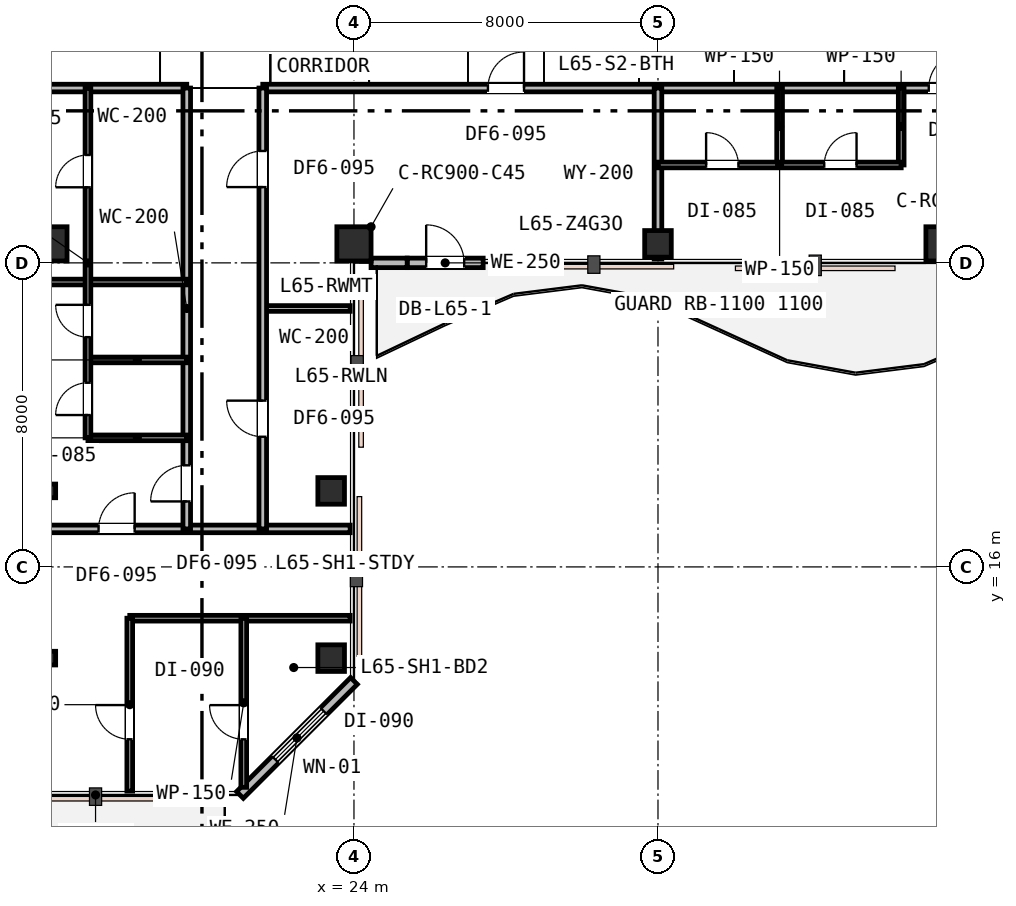
"""IFC4 building model, lengths in metres.
Left out: names, types, materials, properties, quantities, classifications, styles, units other than length and angle.
Written with IfcOpenShell. Run it as: python <this file> out.ifc"""

import sys

from ifc_helpers import new_model, si_unit, direction, frame, frame_2d, origin, origin_2d, place, context, subcontext, project, spatial, rectangle, i_section, extrude, element, fill, save


model = new_model("IFC4")
c1 = context("Model", 3, precision=1e-05, world=origin(), true_north=direction((0.0, 1.0)))
c2 = subcontext(c1, "Body", "Model", "MODEL_VIEW")
j1 = project(units=[si_unit("LENGTHUNIT", "METRE"), si_unit("PLANEANGLEUNIT", "RADIAN")], contexts=[c1])
p1 = place(None, origin())
s1 = spatial("IfcSite", under=j1, at=p1, CompositionType="ELEMENT")
p2 = place(p1, origin())
s2 = spatial("IfcBuilding", under=s1, at=p2, CompositionType="ELEMENT")
p3 = place(p2, frame((0.0, 0.0, 252.6)))
s3 = spatial("IfcBuildingStorey", under=s2, at=p3, CompositionType="ELEMENT", Elevation=252.6)
for number, where, z_axis, x_axis in (
    (1, (16.0, 24.5, 0.0), (0.0, 0.0, 1.0), (1.0, 0.0, 0.0)),
    (2, (24.0, 24.5, 0.0), (0.0, 0.0, 1.0), (1.0, 0.0, 0.0)),
):
    element("IfcColumn", number, at=place(p3, frame(where, z_axis=z_axis, x_axis=x_axis)), inside=s3, PredefinedType="COLUMN", context=c2, shape_type="SweptSolid", body=[
        extrude(rectangle(XDim=0.9, YDim=0.9, at=origin_2d()), origin(), (0.0, 0.0, 1.0), 3.8),
    ])
p4 = place(p3, frame((32.0, 24.5, 0.0), z_axis=(0.0, 0.0, 1.0), x_axis=(1.0, 0.0, 0.0)))
e3 = element("IfcColumn", 3, at=p4, inside=s3, PredefinedType="COLUMN", context=c2, shape_type="SweptSolid", body=[
    extrude(rectangle(XDim=0.7, YDim=0.7, at=origin_2d()), origin(), (0.0, 0.0, 1.0), 3.8),
])
p5 = place(p3, frame((39.5, 24.5, 0.0), z_axis=(0.0, 0.0, 1.0), x_axis=(1.0, 0.0, 0.0)))
e4 = element("IfcColumn", 4, at=p5, inside=s3, PredefinedType="COLUMN", context=c2, shape_type="SweptSolid", body=[
    extrude(rectangle(XDim=0.9, YDim=0.9, at=origin_2d()), origin(), (0.0, 0.0, 1.0), 3.8),
])
for number, where, z_axis, x_axis in (
    (5, (23.4, 13.6, 0.0), (0.0, 0.0, 1.0), (1.0, 0.0, 0.0)),
    (6, (23.4, 18.0, 0.0), (0.0, 0.0, 1.0), (1.0, 0.0, 0.0)),
):
    element("IfcColumn", number, at=place(p3, frame(where, z_axis=z_axis, x_axis=x_axis)), inside=s3, PredefinedType="COLUMN", context=c2, shape_type="SweptSolid", body=[
        extrude(rectangle(XDim=0.7, YDim=0.7, at=origin_2d()), origin(), (0.0, 0.0, 1.0), 3.8),
    ])
for number, where, z_axis, x_axis in (
    (7, (16.0, 13.6, 0.0), (0.0, 0.0, 1.0), (1.0, 0.0, 0.0)),
    (8, (16.0, 18.0, 0.0), (0.0, 0.0, 1.0), (1.0, 0.0, 0.0)),
):
    element("IfcColumn", number, at=place(p3, frame(where, z_axis=z_axis, x_axis=x_axis)), inside=s3, PredefinedType="COLUMN", context=c2, shape_type="SweptSolid", body=[
        extrude(i_section(OverallWidth=0.3, OverallDepth=0.36, WebThickness=0.013, FlangeThickness=0.022, FilletRadius=0.027, at=origin_2d()), origin(), (0.0, 0.0, 1.0), 3.8),
    ])
p6 = place(p3, frame((21.0, 10.0, 0.0), z_axis=(0.0, 0.0, 1.0), x_axis=(0.707106781187, 0.707106781187, 0.0)))
e9 = element("IfcWall", 9, at=p6, inside=s3, PredefinedType="STANDARD", context=c2, shape_type="SweptSolid", body=[
    extrude(rectangle(XDim=4.243, YDim=0.25, at=frame_2d((2.121, 0.0))), origin(), (0.0, 0.0, 1.0), 3.53),
])
p7 = place(p6, frame((1.317, 0.0, 0.75)))
e10 = element("IfcOpeningElement", 10, at=p7, cuts=e9, PredefinedType="OPENING", context=c2, shape_type="SweptSolid", body=[
    extrude(rectangle(XDim=1.8, YDim=1.85, at=frame_2d((0.9, 0.925))), frame((0.0, 0.135, 0.0), z_axis=(0.0, -1.0, 0.0), x_axis=(1.0, 0.0, 0.0)), (0.0, 0.0, 1.0), 0.27),
])
p8 = place(p3, frame((25.4, 24.0, 0.0), z_axis=(0.0, 0.0, 1.0), x_axis=(1.0, 0.0, 0.0)))
e11 = element("IfcWall", 11, at=p8, inside=s3, PredefinedType="STANDARD", context=c2, shape_type="SweptSolid", body=[
    extrude(rectangle(XDim=2.0, YDim=0.25, at=frame_2d((1.0, 0.0))), origin(), (0.0, 0.0, 1.0), 3.27),
])
p9 = place(p8, frame((0.5, 0.0, 0.0)))
e12 = element("IfcOpeningElement", 12, at=p9, cuts=e11, PredefinedType="OPENING", context=c2, shape_type="SweptSolid", body=[
    extrude(rectangle(XDim=1.0, YDim=2.15, at=frame_2d((0.5, 1.075))), frame((0.0, 0.135, 0.0), z_axis=(0.0, -1.0, 0.0), x_axis=(1.0, 0.0, 0.0)), (0.0, 0.0, 1.0), 0.27),
])
p10 = place(p3, frame((24.45, 24.0, 0.0), z_axis=(0.0, 0.0, 1.0), x_axis=(1.0, 0.0, 0.0)))
e13 = element("IfcWall", 13, at=p10, inside=s3, PredefinedType="STANDARD", context=c2, shape_type="SweptSolid", body=[
    extrude(rectangle(XDim=0.95, YDim=0.25, at=frame_2d((0.475, 0.0))), origin(), (0.0, 0.0, 1.0), 3.27),
])
p11 = place(p3, frame((15.2, 28.6, 0.0), z_axis=(0.0, 0.0, 1.0), x_axis=(1.0, 0.0, 0.0)))
e14 = element("IfcWall", 14, at=p11, inside=s3, PredefinedType="PARTITIONING", context=c2, shape_type="SweptSolid", body=[
    extrude(rectangle(XDim=4.4, YDim=0.2, at=frame_2d((2.2, 0.0))), origin(), (0.0, 0.0, 1.0), 3.16),
])
p12 = place(p3, frame((21.6, 28.6, 0.0), z_axis=(0.0, 0.0, 1.0), x_axis=(1.0, 0.0, 0.0)))
e15 = element("IfcWall", 15, at=p12, inside=s3, PredefinedType="PARTITIONING", context=c2, shape_type="SweptSolid", body=[
    extrude(rectangle(XDim=24.3, YDim=0.2, at=frame_2d((12.15, 0.0))), origin(), (0.0, 0.0, 1.0), 3.16),
])
p13 = place(p12, frame((5.925, 0.0, 0.0)))
e16 = element("IfcOpeningElement", 16, at=p13, cuts=e15, PredefinedType="OPENING", context=c2, shape_type="SweptSolid", body=[
    extrude(rectangle(XDim=0.95, YDim=2.15, at=frame_2d((0.475, 1.075))), frame((0.0, 0.11, 0.0), z_axis=(0.0, -1.0, 0.0), x_axis=(1.0, 0.0, 0.0)), (0.0, 0.0, 1.0), 0.22),
])
p14 = place(p12, frame((17.525, 0.0, 0.0)))
e17 = element("IfcOpeningElement", 17, at=p14, cuts=e15, PredefinedType="OPENING", context=c2, shape_type="SweptSolid", body=[
    extrude(rectangle(XDim=0.95, YDim=2.15, at=frame_2d((0.475, 1.075))), frame((0.0, 0.11, 0.0), z_axis=(0.0, -1.0, 0.0), x_axis=(1.0, 0.0, 0.0)), (0.0, 0.0, 1.0), 0.22),
])
p15 = place(p3, frame((32.0, 24.1, 0.0), z_axis=(0.0, 0.0, 1.0), x_axis=(0.0, 1.0, 0.0)))
e18 = element("IfcWall", 18, at=p15, inside=s3, PredefinedType="PARTITIONING", context=c2, shape_type="SweptSolid", body=[
    extrude(rectangle(XDim=4.5, YDim=0.2, at=frame_2d((2.25, 0.0))), origin(), (0.0, 0.0, 1.0), 3.16),
])
for number, where, z_axis, x_axis in (
    (19, (38.4, 26.576, 0.0), (0.0, 0.0, 1.0), (0.0, 1.0, 0.0)),
    (20, (35.2, 26.576, 0.0), (0.0, 0.0, 1.0), (0.0, 1.0, 0.0)),
):
    element("IfcWall", number, at=place(p3, frame(where, z_axis=z_axis, x_axis=x_axis)), inside=s3, PredefinedType="PARTITIONING", context=c2, shape_type="SweptSolid", body=[
        extrude(rectangle(XDim=2.024, YDim=0.15, at=frame_2d((1.012, 0.0))), origin(), (0.0, 0.0, 1.0), 3.53),
    ])
p16 = place(p3, frame((32.0, 26.576, 0.0), z_axis=(0.0, 0.0, 1.0), x_axis=(1.0, 0.0, 0.0)))
e21 = element("IfcWall", 21, at=p16, inside=s3, PredefinedType="PARTITIONING", context=c2, shape_type="SweptSolid", body=[
    extrude(rectangle(XDim=6.4, YDim=0.15, at=frame_2d((3.2, 0.0))), origin(), (0.0, 0.0, 1.0), 3.16),
])
p17 = place(p16, frame((1.266, 0.0, 0.0)))
e22 = element("IfcOpeningElement", 22, at=p17, cuts=e21, PredefinedType="OPENING", context=c2, shape_type="SweptSolid", body=[
    extrude(rectangle(XDim=0.85, YDim=2.15, at=frame_2d((0.425, 1.075))), frame((0.0, 0.085, 0.0), z_axis=(0.0, -1.0, 0.0), x_axis=(1.0, 0.0, 0.0)), (0.0, 0.0, 1.0), 0.17),
])
p18 = place(p16, frame((4.375, 0.0, 0.0)))
e23 = element("IfcOpeningElement", 23, at=p18, cuts=e21, PredefinedType="OPENING", context=c2, shape_type="SweptSolid", body=[
    extrude(rectangle(XDim=0.85, YDim=2.15, at=frame_2d((0.425, 1.075))), frame((0.0, 0.085, 0.0), z_axis=(0.0, -1.0, 0.0), x_axis=(1.0, 0.0, 0.0)), (0.0, 0.0, 1.0), 0.17),
])
p19 = place(p3, frame((5.1, 17.0, 0.0), z_axis=(0.0, 0.0, 1.0), x_axis=(1.0, 0.0, 0.0)))
e24 = element("IfcWall", 24, at=p19, inside=s3, PredefinedType="PARTITIONING", context=c2, shape_type="SweptSolid", body=[
    extrude(rectangle(XDim=18.8, YDim=0.2, at=frame_2d((9.4, 0.0))), origin(), (0.0, 0.0, 1.0), 3.16),
])
p20 = place(p19, frame((12.179, 0.0, 0.0)))
e25 = element("IfcOpeningElement", 25, at=p20, cuts=e24, PredefinedType="OPENING", context=c2, shape_type="SweptSolid", body=[
    extrude(rectangle(XDim=0.95, YDim=2.15, at=frame_2d((0.475, 1.075))), frame((0.0, 0.11, 0.0), z_axis=(0.0, -1.0, 0.0), x_axis=(1.0, 0.0, 0.0)), (0.0, 0.0, 1.0), 0.22),
])
p21 = place(p3, frame((19.6, 17.0, 0.0), z_axis=(0.0, 0.0, 1.0), x_axis=(0.0, 1.0, 0.0)))
e26 = element("IfcWall", 26, at=p21, inside=s3, PredefinedType="PARTITIONING", context=c2, shape_type="SweptSolid", body=[
    extrude(rectangle(XDim=11.6, YDim=0.2, at=frame_2d((5.8, 0.0))), origin(), (0.0, 0.0, 1.0), 3.16),
])
p22 = place(p21, frame((0.723, 0.0, 0.0)))
e27 = element("IfcOpeningElement", 27, at=p22, cuts=e26, PredefinedType="OPENING", context=c2, shape_type="SweptSolid", body=[
    extrude(rectangle(XDim=0.95, YDim=2.15, at=frame_2d((0.475, 1.075))), frame((0.0, 0.11, 0.0), z_axis=(0.0, -1.0, 0.0), x_axis=(1.0, 0.0, 0.0)), (0.0, 0.0, 1.0), 0.22),
])
for number, where, z_axis, x_axis in (
    (28, (17.0, 19.396, 0.0), (0.0, 0.0, 1.0), (1.0, 0.0, 0.0)),
    (29, (17.0, 21.446, 0.0), (0.0, 0.0, 1.0), (1.0, 0.0, 0.0)),
):
    element("IfcWall", number, at=place(p3, frame(where, z_axis=z_axis, x_axis=x_axis)), inside=s3, PredefinedType="PARTITIONING", context=c2, shape_type="SweptSolid", body=[
        extrude(rectangle(XDim=2.6, YDim=0.15, at=frame_2d((1.3, 0.0))), origin(), (0.0, 0.0, 1.0), 3.53),
    ])
p23 = place(p3, frame((5.1, 23.496, 0.0), z_axis=(0.0, 0.0, 1.0), x_axis=(1.0, 0.0, 0.0)))
e30 = element("IfcWall", 30, at=p23, inside=s3, PredefinedType="PARTITIONING", context=c2, shape_type="SweptSolid", body=[
    extrude(rectangle(XDim=14.5, YDim=0.15, at=frame_2d((7.25, 0.0))), origin(), (0.0, 0.0, 1.0), 3.16),
])
p24 = place(p23, frame((5.5, 0.0, 0.0)))
e31 = element("IfcOpeningElement", 31, at=p24, cuts=e30, PredefinedType="OPENING", context=c2, shape_type="SweptSolid", body=[
    extrude(rectangle(XDim=0.9, YDim=2.15, at=frame_2d((0.45, 1.075))), frame((0.0, 0.085, 0.0), z_axis=(0.0, -1.0, 0.0), x_axis=(1.0, 0.0, 0.0)), (0.0, 0.0, 1.0), 0.17),
])
p25 = place(p3, frame((17.0, 19.396, 0.0), z_axis=(0.0, 0.0, 1.0), x_axis=(0.0, 1.0, 0.0)))
e32 = element("IfcWall", 32, at=p25, inside=s3, PredefinedType="PARTITIONING", context=c2, shape_type="SweptSolid", body=[
    extrude(rectangle(XDim=9.204, YDim=0.15, at=frame_2d((4.602, 0.0))), origin(), (0.0, 0.0, 1.0), 3.16),
])
p26 = place(p25, frame((0.6, 0.0, 0.0)))
e33 = element("IfcOpeningElement", 33, at=p26, cuts=e32, PredefinedType="OPENING", context=c2, shape_type="SweptSolid", body=[
    extrude(rectangle(XDim=0.85, YDim=2.15, at=frame_2d((0.425, 1.075))), frame((0.0, 0.085, 0.0), z_axis=(0.0, -1.0, 0.0), x_axis=(1.0, 0.0, 0.0)), (0.0, 0.0, 1.0), 0.17),
])
p27 = place(p25, frame((2.65, 0.0, 0.0)))
e34 = element("IfcOpeningElement", 34, at=p27, cuts=e32, PredefinedType="OPENING", context=c2, shape_type="SweptSolid", body=[
    extrude(rectangle(XDim=0.85, YDim=2.15, at=frame_2d((0.425, 1.075))), frame((0.0, 0.085, 0.0), z_axis=(0.0, -1.0, 0.0), x_axis=(1.0, 0.0, 0.0)), (0.0, 0.0, 1.0), 0.17),
])
p28 = place(p25, frame((6.593, 0.0, 0.0)))
e35 = element("IfcOpeningElement", 35, at=p28, cuts=e32, PredefinedType="OPENING", context=c2, shape_type="SweptSolid", body=[
    extrude(rectangle(XDim=0.85, YDim=2.15, at=frame_2d((0.425, 1.075))), frame((0.0, 0.085, 0.0), z_axis=(0.0, -1.0, 0.0), x_axis=(1.0, 0.0, 0.0)), (0.0, 0.0, 1.0), 0.17),
])
p29 = place(p3, frame((21.6, 22.8, 0.0), z_axis=(0.0, 0.0, 1.0), x_axis=(1.0, 0.0, 0.0)))
e36 = element("IfcWall", 36, at=p29, inside=s3, PredefinedType="PARTITIONING", context=c2, shape_type="SweptSolid", body=[
    extrude(rectangle(XDim=2.3, YDim=0.15, at=frame_2d((1.15, 0.0))), origin(), (0.0, 0.0, 1.0), 3.53),
])
p30 = place(p3, frame((21.6, 17.0, 0.0), z_axis=(0.0, 0.0, 1.0), x_axis=(0.0, 1.0, 0.0)))
e37 = element("IfcWall", 37, at=p30, inside=s3, PredefinedType="PARTITIONING", context=c2, shape_type="SweptSolid", body=[
    extrude(rectangle(XDim=11.6, YDim=0.2, at=frame_2d((5.8, 0.0))), origin(), (0.0, 0.0, 1.0), 3.16),
])
p31 = place(p30, frame((8.994, 0.0, 0.0)))
e38 = element("IfcOpeningElement", 38, at=p31, cuts=e37, PredefinedType="OPENING", context=c2, shape_type="SweptSolid", body=[
    extrude(rectangle(XDim=0.95, YDim=2.15, at=frame_2d((0.475, 1.075))), frame((0.0, 0.11, 0.0), z_axis=(0.0, -1.0, 0.0), x_axis=(1.0, 0.0, 0.0)), (0.0, 0.0, 1.0), 0.22),
])
p32 = place(p30, frame((2.425, 0.0, 0.0)))
e39 = element("IfcOpeningElement", 39, at=p32, cuts=e37, PredefinedType="OPENING", context=c2, shape_type="SweptSolid", body=[
    extrude(rectangle(XDim=0.95, YDim=2.15, at=frame_2d((0.475, 1.075))), frame((0.0, 0.11, 0.0), z_axis=(0.0, -1.0, 0.0), x_axis=(1.0, 0.0, 0.0)), (0.0, 0.0, 1.0), 0.22),
])
p33 = place(p3, frame((18.1, 14.65, 0.0), z_axis=(0.0, 0.0, 1.0), x_axis=(1.0, 0.0, 0.0)))
e40 = element("IfcWall", 40, at=p33, inside=s3, PredefinedType="PARTITIONING", context=c2, shape_type="SweptSolid", body=[
    extrude(rectangle(XDim=5.8, YDim=0.15, at=frame_2d((2.9, 0.0))), origin(), (0.0, 0.0, 1.0), 3.53),
])
p34 = place(p3, frame((21.1, 10.2, 0.0), z_axis=(0.0, 0.0, 1.0), x_axis=(0.0, 1.0, 0.0)))
e41 = element("IfcWall", 41, at=p34, inside=s3, PredefinedType="PARTITIONING", context=c2, shape_type="SweptSolid", body=[
    extrude(rectangle(XDim=4.45, YDim=0.15, at=frame_2d((2.225, 0.0))), origin(), (0.0, 0.0, 1.0), 3.53),
])
p35 = place(p34, frame((1.263, 0.0, 0.0)))
e42 = element("IfcOpeningElement", 42, at=p35, cuts=e41, PredefinedType="OPENING", context=c2, shape_type="SweptSolid", body=[
    extrude(rectangle(XDim=0.9, YDim=2.15, at=frame_2d((0.45, 1.075))), frame((0.0, 0.085, 0.0), z_axis=(0.0, -1.0, 0.0), x_axis=(1.0, 0.0, 0.0)), (0.0, 0.0, 1.0), 0.17),
])
p36 = place(p3, frame((18.1, 10.1, 0.0), z_axis=(0.0, 0.0, 1.0), x_axis=(0.0, 1.0, 0.0)))
e43 = element("IfcWall", 43, at=p36, inside=s3, PredefinedType="PARTITIONING", context=c2, shape_type="SweptSolid", body=[
    extrude(rectangle(XDim=4.55, YDim=0.15, at=frame_2d((2.275, 0.0))), origin(), (0.0, 0.0, 1.0), 3.53),
])
p37 = place(p36, frame((1.365, 0.0, 0.0)))
e44 = element("IfcOpeningElement", 44, at=p37, cuts=e43, PredefinedType="OPENING", context=c2, shape_type="SweptSolid", body=[
    extrude(rectangle(XDim=0.9, YDim=2.15, at=frame_2d((0.45, 1.075))), frame((0.0, 0.085, 0.0), z_axis=(0.0, -1.0, 0.0), x_axis=(1.0, 0.0, 0.0)), (0.0, 0.0, 1.0), 0.17),
])
p38 = place(p7, origin())
e45 = element("IfcWindow", 45, at=p38, inside=s3, PartitioningType="SINGLE_PANEL", PredefinedType="WINDOW", context=c2, shape_type="SweptSolid", body=[
    extrude(rectangle(XDim=1.8, YDim=1.85, at=frame_2d((0.9, 0.925))), frame((0.0, 0.03, 0.0), z_axis=(0.0, -1.0, 0.0), x_axis=(1.0, 0.0, 0.0)), (0.0, 0.0, 1.0), 0.06),
])
fill(e10, e45)
p39 = place(p9, origin())
e46 = element("IfcDoor", 46, at=p39, inside=s3, OperationType="SINGLE_SWING_LEFT", PredefinedType="DOOR", context=c2, shape_type="SweptSolid", body=[
    extrude(rectangle(XDim=1.0, YDim=2.15, at=frame_2d((0.5, 1.075))), frame((0.0, 0.025, 0.0), z_axis=(0.0, -1.0, 0.0), x_axis=(1.0, 0.0, 0.0)), (0.0, 0.0, 1.0), 0.05),
])
fill(e12, e46)
p40 = place(p13, origin())
e47 = element("IfcDoor", 47, at=p40, inside=s3, OperationType="SINGLE_SWING_RIGHT", PredefinedType="DOOR", context=c2, shape_type="SweptSolid", body=[
    extrude(rectangle(XDim=0.95, YDim=2.15, at=frame_2d((0.475, 1.075))), frame((0.0, 0.025, 0.0), z_axis=(0.0, -1.0, 0.0), x_axis=(1.0, 0.0, 0.0)), (0.0, 0.0, 1.0), 0.05),
])
fill(e16, e47)
p41 = place(p14, origin())
e48 = element("IfcDoor", 48, at=p41, inside=s3, OperationType="SINGLE_SWING_RIGHT", PredefinedType="DOOR", context=c2, shape_type="SweptSolid", body=[
    extrude(rectangle(XDim=0.95, YDim=2.15, at=frame_2d((0.475, 1.075))), frame((0.0, 0.025, 0.0), z_axis=(0.0, -1.0, 0.0), x_axis=(1.0, 0.0, 0.0)), (0.0, 0.0, 1.0), 0.05),
])
fill(e17, e48)
p42 = place(p17, origin())
e49 = element("IfcDoor", 49, at=p42, inside=s3, OperationType="SINGLE_SWING_LEFT", PredefinedType="DOOR", context=c2, shape_type="SweptSolid", body=[
    extrude(rectangle(XDim=0.85, YDim=2.15, at=frame_2d((0.425, 1.075))), frame((0.0, 0.025, 0.0), z_axis=(0.0, -1.0, 0.0), x_axis=(1.0, 0.0, 0.0)), (0.0, 0.0, 1.0), 0.05),
])
fill(e22, e49)
p43 = place(p18, origin())
e50 = element("IfcDoor", 50, at=p43, inside=s3, OperationType="SINGLE_SWING_RIGHT", PredefinedType="DOOR", context=c2, shape_type="SweptSolid", body=[
    extrude(rectangle(XDim=0.85, YDim=2.15, at=frame_2d((0.425, 1.075))), frame((0.0, 0.025, 0.0), z_axis=(0.0, -1.0, 0.0), x_axis=(1.0, 0.0, 0.0)), (0.0, 0.0, 1.0), 0.05),
])
fill(e23, e50)
p44 = place(p22, origin())
e51 = element("IfcDoor", 51, at=p44, inside=s3, OperationType="SINGLE_SWING_LEFT", PredefinedType="DOOR", context=c2, shape_type="SweptSolid", body=[
    extrude(rectangle(XDim=0.95, YDim=2.15, at=frame_2d((0.475, 1.075))), frame((0.0, 0.025, 0.0), z_axis=(0.0, -1.0, 0.0), x_axis=(1.0, 0.0, 0.0)), (0.0, 0.0, 1.0), 0.05),
])
fill(e27, e51)
p45 = place(p26, origin())
e52 = element("IfcDoor", 52, at=p45, inside=s3, OperationType="SINGLE_SWING_LEFT", PredefinedType="DOOR", context=c2, shape_type="SweptSolid", body=[
    extrude(rectangle(XDim=0.85, YDim=2.15, at=frame_2d((0.425, 1.075))), frame((0.0, 0.025, 0.0), z_axis=(0.0, -1.0, 0.0), x_axis=(1.0, 0.0, 0.0)), (0.0, 0.0, 1.0), 0.05),
])
fill(e33, e52)
p46 = place(p27, origin())
e53 = element("IfcDoor", 53, at=p46, inside=s3, OperationType="SINGLE_SWING_RIGHT", PredefinedType="DOOR", context=c2, shape_type="SweptSolid", body=[
    extrude(rectangle(XDim=0.85, YDim=2.15, at=frame_2d((0.425, 1.075))), frame((0.0, 0.025, 0.0), z_axis=(0.0, -1.0, 0.0), x_axis=(1.0, 0.0, 0.0)), (0.0, 0.0, 1.0), 0.05),
])
fill(e34, e53)
p47 = place(p28, origin())
e54 = element("IfcDoor", 54, at=p47, inside=s3, OperationType="SINGLE_SWING_LEFT", PredefinedType="DOOR", context=c2, shape_type="SweptSolid", body=[
    extrude(rectangle(XDim=0.85, YDim=2.15, at=frame_2d((0.425, 1.075))), frame((0.0, 0.025, 0.0), z_axis=(0.0, -1.0, 0.0), x_axis=(1.0, 0.0, 0.0)), (0.0, 0.0, 1.0), 0.05),
])
fill(e35, e54)
p48 = place(p31, origin())
e55 = element("IfcDoor", 55, at=p48, inside=s3, OperationType="SINGLE_SWING_LEFT", PredefinedType="DOOR", context=c2, shape_type="SweptSolid", body=[
    extrude(rectangle(XDim=0.95, YDim=2.15, at=frame_2d((0.475, 1.075))), frame((0.0, 0.025, 0.0), z_axis=(0.0, -1.0, 0.0), x_axis=(1.0, 0.0, 0.0)), (0.0, 0.0, 1.0), 0.05),
])
fill(e38, e55)
p49 = place(p32, origin())
e56 = element("IfcDoor", 56, at=p49, inside=s3, OperationType="SINGLE_SWING_RIGHT", PredefinedType="DOOR", context=c2, shape_type="SweptSolid", body=[
    extrude(rectangle(XDim=0.95, YDim=2.15, at=frame_2d((0.475, 1.075))), frame((0.0, 0.025, 0.0), z_axis=(0.0, -1.0, 0.0), x_axis=(1.0, 0.0, 0.0)), (0.0, 0.0, 1.0), 0.05),
])
fill(e39, e56)
p50 = place(p20, origin())
e57 = element("IfcDoor", 57, at=p50, inside=s3, OperationType="SINGLE_SWING_RIGHT", PredefinedType="DOOR", context=c2, shape_type="SweptSolid", body=[
    extrude(rectangle(XDim=0.95, YDim=2.15, at=frame_2d((0.475, 1.075))), frame((0.0, 0.025, 0.0), z_axis=(0.0, -1.0, 0.0), x_axis=(1.0, 0.0, 0.0)), (0.0, 0.0, 1.0), 0.05),
])
fill(e25, e57)
p51 = place(p35, origin())
e58 = element("IfcDoor", 58, at=p51, inside=s3, OperationType="SINGLE_SWING_RIGHT", PredefinedType="DOOR", context=c2, shape_type="SweptSolid", body=[
    extrude(rectangle(XDim=0.9, YDim=2.15, at=frame_2d((0.45, 1.075))), frame((0.0, 0.025, 0.0), z_axis=(0.0, -1.0, 0.0), x_axis=(1.0, 0.0, 0.0)), (0.0, 0.0, 1.0), 0.05),
])
fill(e42, e58)
p52 = place(p37, origin())
e59 = element("IfcDoor", 59, at=p52, inside=s3, OperationType="SINGLE_SWING_RIGHT", PredefinedType="DOOR", context=c2, shape_type="SweptSolid", body=[
    extrude(rectangle(XDim=0.9, YDim=2.15, at=frame_2d((0.45, 1.075))), frame((0.0, 0.025, 0.0), z_axis=(0.0, -1.0, 0.0), x_axis=(1.0, 0.0, 0.0)), (0.0, 0.0, 1.0), 0.05),
])
fill(e44, e59)
save(model, sys.argv[1])
